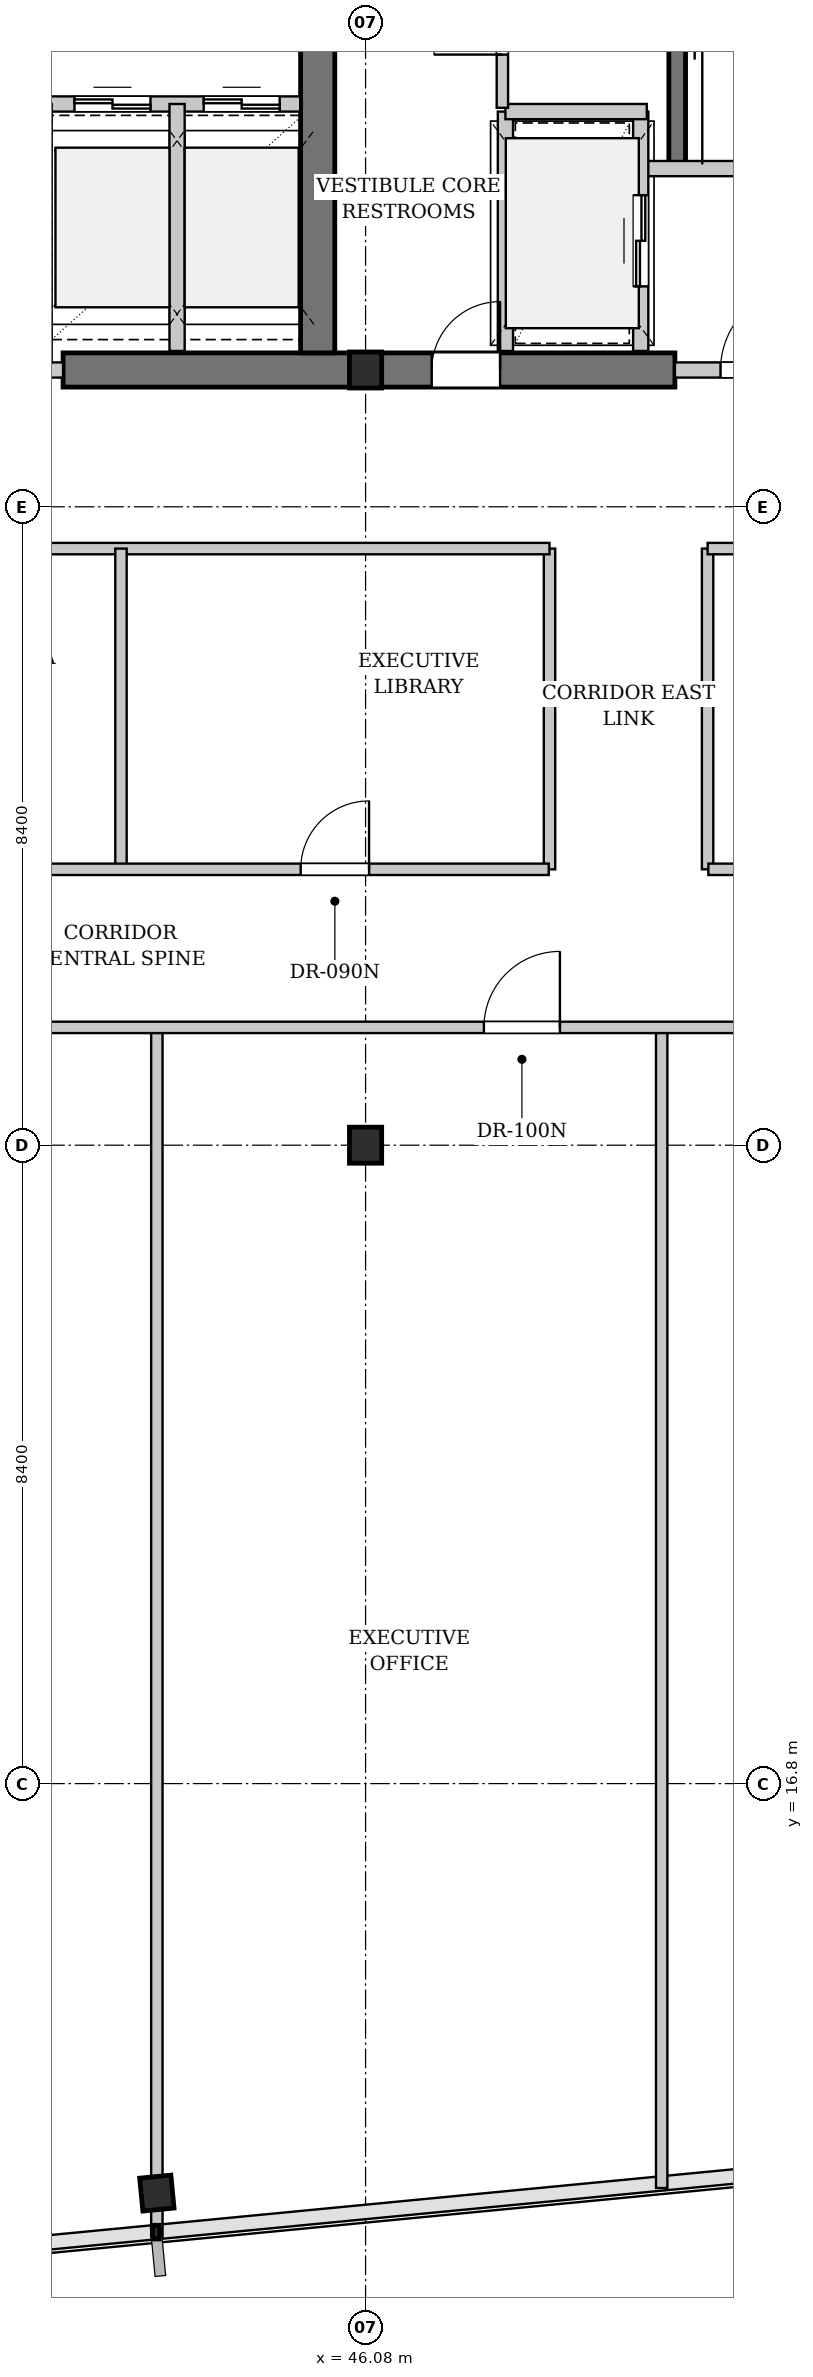
"""IFC4 building model, lengths in metres.
Left out: names, types, materials, properties, quantities, classifications, styles, units other than length and angle.
Written with IfcOpenShell. Run it as: python <this file> out.ifc"""

import sys

from ifc_helpers import new_model, si_unit, direction, frame, frame_2d, origin, origin_2d, place, context, subcontext, project, spatial, rectangle, i_section, extrude, element, fill, save


model = new_model("IFC4")
c1 = context("Model", 3, precision=1e-05, world=origin(), true_north=direction((0.0, 1.0)))
c2 = subcontext(c1, "Body", "Model", "MODEL_VIEW")
j1 = project(units=[si_unit("LENGTHUNIT", "METRE"), si_unit("PLANEANGLEUNIT", "RADIAN")], contexts=[c1])
p1 = place(None, origin())
s1 = spatial("IfcSite", under=j1, at=p1, CompositionType="ELEMENT")
p2 = place(p1, origin())
s2 = spatial("IfcBuilding", under=s1, at=p2, CompositionType="ELEMENT")
p3 = place(p2, frame((0.0, 0.0, 106.7)))
s3 = spatial("IfcBuildingStorey", under=s2, at=p3, CompositionType="ELEMENT", Elevation=106.7)
p4 = place(p3, frame((42.1, 35.4, 0.0), z_axis=(0.0, 0.0, 1.0), x_axis=(1.0, 0.0, 0.0)))
e1 = element("IfcWall", 1, at=p4, inside=s3, PredefinedType="SHEAR", context=c2, shape_type="SweptSolid", body=[
    extrude(rectangle(XDim=8.05, YDim=0.45, at=frame_2d((4.025, 0.0))), origin(), (0.0, 0.0, 1.0), 3.18),
])
p5 = place(p4, frame((4.85, 0.0, 0.0)))
e2 = element("IfcOpeningElement", 2, at=p5, cuts=e1, PredefinedType="OPENING", context=c2, shape_type="SweptSolid", body=[
    extrude(rectangle(XDim=0.9, YDim=2.15, at=frame_2d((0.45, 1.075))), frame((0.0, 0.235, 0.0), z_axis=(0.0, -1.0, 0.0), x_axis=(1.0, 0.0, 0.0)), (0.0, 0.0, 1.0), 0.47),
])
p6 = place(p3, frame((45.45, 35.625, 0.0), z_axis=(0.0, 0.0, 1.0), x_axis=(0.0, 1.0, 0.0)))
e3 = element("IfcWall", 3, at=p6, inside=s3, PredefinedType="SHEAR", context=c2, shape_type="SweptSolid", body=[
    extrude(rectangle(XDim=10.35, YDim=0.45, at=frame_2d((5.175, 0.0))), origin(), (0.0, 0.0, 1.0), 3.18),
])
p7 = place(p3, frame((50.18, 38.05, 0.0), z_axis=(0.0, 0.0, 1.0), x_axis=(0.0, 1.0, 0.0)))
e4 = element("IfcWall", 4, at=p7, inside=s3, PredefinedType="SHEAR", context=c2, shape_type="SweptSolid", body=[
    extrude(rectangle(XDim=7.925, YDim=0.22, at=frame_2d((3.962, 0.0))), origin(), (0.0, 0.0, 1.0), 3.18),
])
for number, where, z_axis, x_axis in (
    (5, (46.08, 35.4, 0.0), (0.0, 0.0, 1.0), (1.0, 0.0, 0.0)),
    (6, (46.08, 25.2, 0.0), (0.0, 0.0, 1.0), (1.0, 0.0, 0.0)),
):
    element("IfcColumn", number, at=place(p3, frame(where, z_axis=z_axis, x_axis=x_axis)), inside=s3, PredefinedType="COLUMN", context=c2, shape_type="SweptSolid", body=[
        extrude(i_section(OverallWidth=0.424, OverallDepth=0.474, WebThickness=0.047, FlangeThickness=0.077, FilletRadius=0.015, at=origin_2d()), origin(), (0.0, 0.0, 1.0), 3.4),
    ])
p8 = place(p3, frame((43.334, 11.412, 0.0), z_axis=(0.0, 0.0, 1.0), x_axis=(0.995396198367, 0.09584575252, 0.0)))
e7 = element("IfcColumn", 7, at=p8, inside=s3, PredefinedType="COLUMN", context=c2, shape_type="SweptSolid", body=[
    extrude(i_section(OverallWidth=0.412, OverallDepth=0.435, WebThickness=0.036, FlangeThickness=0.058, FilletRadius=0.015, at=origin_2d()), origin(), (0.0, 0.0, 1.0), 3.4),
])
p9 = place(p3, frame((35.6, 35.4, 0.0), z_axis=(0.0, 0.0, 1.0), x_axis=(1.0, 0.0, 0.0)))
e8 = element("IfcWall", 8, at=p9, inside=s3, PredefinedType="PARTITIONING", context=c2, shape_type="SweptSolid", body=[
    extrude(rectangle(XDim=6.5, YDim=0.2, at=frame_2d((3.25, 0.0))), origin(), (0.0, 0.0, 1.0), 2.525),
])
p10 = place(p9, frame((3.8, 0.0, 0.0)))
e9 = element("IfcOpeningElement", 9, at=p10, cuts=e8, PredefinedType="OPENING", context=c2, shape_type="SweptSolid", body=[
    extrude(rectangle(XDim=1.8, YDim=2.3, at=frame_2d((0.9, 1.15))), frame((0.0, 0.11, 0.0), z_axis=(0.0, -1.0, 0.0), x_axis=(1.0, 0.0, 0.0)), (0.0, 0.0, 1.0), 0.22),
])
p11 = place(p3, frame((41.85, 38.9, 0.0), z_axis=(0.0, 0.0, 1.0), x_axis=(1.0, 0.0, 0.0)))
e10 = element("IfcWall", 10, at=p11, inside=s3, PredefinedType="PARTITIONING", context=c2, shape_type="SweptSolid", body=[
    extrude(rectangle(XDim=3.37, YDim=0.2, at=frame_2d((1.685, 0.0))), origin(), (0.0, 0.0, 1.0), 3.18),
])
p12 = place(p11, frame((0.4, 0.0, 0.0)))
e11 = element("IfcOpeningElement", 11, at=p12, cuts=e10, PredefinedType="OPENING", context=c2, shape_type="SweptSolid", body=[
    extrude(rectangle(XDim=1.0, YDim=2.2, at=frame_2d((0.5, 1.1))), frame((0.0, 0.11, 0.0), z_axis=(0.0, -1.0, 0.0), x_axis=(1.0, 0.0, 0.0)), (0.0, 0.0, 1.0), 0.22),
])
p13 = place(p11, frame((2.1, 0.0, 0.0)))
e12 = element("IfcOpeningElement", 12, at=p13, cuts=e10, PredefinedType="OPENING", context=c2, shape_type="SweptSolid", body=[
    extrude(rectangle(XDim=1.0, YDim=2.2, at=frame_2d((0.5, 1.1))), frame((0.0, 0.11, 0.0), z_axis=(0.0, -1.0, 0.0), x_axis=(1.0, 0.0, 0.0)), (0.0, 0.0, 1.0), 0.22),
])
p14 = place(p3, frame((43.6, 35.65, 0.0), z_axis=(0.0, 0.0, 1.0), x_axis=(0.0, 1.0, 0.0)))
e13 = element("IfcWall", 13, at=p14, inside=s3, PredefinedType="PARTITIONING", context=c2, shape_type="SweptSolid", body=[
    extrude(rectangle(XDim=3.25, YDim=0.2, at=frame_2d((1.625, 0.0))), origin(), (0.0, 0.0, 1.0), 3.18),
])
p15 = place(p3, frame((49.78, 38.05, 0.0), z_axis=(0.0, 0.0, 1.0), x_axis=(1.0, 0.0, 0.0)))
e14 = element("IfcWall", 14, at=p15, inside=s3, PredefinedType="PARTITIONING", context=c2, shape_type="SweptSolid", body=[
    extrude(rectangle(XDim=3.72, YDim=0.2, at=frame_2d((1.86, 0.0))), origin(), (0.0, 0.0, 1.0), 3.18),
])
p16 = place(p15, frame((1.436, 0.0, 0.0)))
e15 = element("IfcOpeningElement", 15, at=p16, cuts=e14, PredefinedType="OPENING", context=c2, shape_type="SweptSolid", body=[
    extrude(rectangle(XDim=1.1, YDim=2.15, at=frame_2d((0.55, 1.075))), frame((0.0, 0.11, 0.0), z_axis=(0.0, -1.0, 0.0), x_axis=(1.0, 0.0, 0.0)), (0.0, 0.0, 1.0), 0.22),
])
p17 = place(p3, frame((50.15, 35.4, 0.0), z_axis=(0.0, 0.0, 1.0), x_axis=(1.0, 0.0, 0.0)))
e16 = element("IfcWall", 16, at=p17, inside=s3, PredefinedType="PARTITIONING", context=c2, shape_type="SweptSolid", body=[
    extrude(rectangle(XDim=2.3, YDim=0.2, at=frame_2d((1.15, 0.0))), origin(), (0.0, 0.0, 1.0), 2.525),
])
p18 = place(p17, frame((0.6, 0.0, 0.0)))
e17 = element("IfcOpeningElement", 17, at=p18, cuts=e16, PredefinedType="OPENING", context=c2, shape_type="SweptSolid", body=[
    extrude(rectangle(XDim=1.1, YDim=2.15, at=frame_2d((0.55, 1.075))), frame((0.0, 0.11, 0.0), z_axis=(0.0, -1.0, 0.0), x_axis=(1.0, 0.0, 0.0)), (0.0, 0.0, 1.0), 0.22),
])
p19 = place(p3, frame((49.7, 35.65, 0.0), z_axis=(0.0, 0.0, 1.0), x_axis=(0.0, 1.0, 0.0)))
e18 = element("IfcWall", 18, at=p19, inside=s3, PredefinedType="PARTITIONING", context=c2, shape_type="SweptSolid", body=[
    extrude(rectangle(XDim=3.15, YDim=0.2, at=frame_2d((1.575, 0.0))), origin(), (0.0, 0.0, 1.0), 3.18),
])
p20 = place(p19, frame((0.85, 0.0, 0.0)))
e19 = element("IfcOpeningElement", 19, at=p20, cuts=e18, PredefinedType="OPENING", context=c2, shape_type="SweptSolid", body=[
    extrude(rectangle(XDim=1.2, YDim=2.2, at=frame_2d((0.6, 1.1))), frame((0.0, 0.11, 0.0), z_axis=(0.0, -1.0, 0.0), x_axis=(1.0, 0.0, 0.0)), (0.0, 0.0, 1.0), 0.22),
])
p21 = place(p3, frame((47.92, 35.65, 0.0), z_axis=(0.0, 0.0, 1.0), x_axis=(0.0, 1.0, 0.0)))
e20 = element("IfcWall", 20, at=p21, inside=s3, PredefinedType="PARTITIONING", context=c2, shape_type="SweptSolid", body=[
    extrude(rectangle(XDim=3.15, YDim=0.2, at=frame_2d((1.575, 0.0))), origin(), (0.0, 0.0, 1.0), 3.18),
])
p22 = place(p3, frame((47.92, 38.8, 0.0), z_axis=(0.0, 0.0, 1.0), x_axis=(1.0, 0.0, 0.0)))
e21 = element("IfcWall", 21, at=p22, inside=s3, PredefinedType="PARTITIONING", context=c2, shape_type="SweptSolid", body=[
    extrude(rectangle(XDim=1.86, YDim=0.2, at=frame_2d((0.93, 0.0))), origin(), (0.0, 0.0, 1.0), 3.18),
])
p23 = place(p3, frame((47.88, 38.85, 0.0), z_axis=(0.0, 0.0, 1.0), x_axis=(0.0, 1.0, 0.0)))
e22 = element("IfcWall", 22, at=p23, inside=s3, PredefinedType="PARTITIONING", context=c2, shape_type="SweptSolid", body=[
    extrude(rectangle(XDim=4.87, YDim=0.15, at=frame_2d((2.435, 0.0))), origin(), (0.0, 0.0, 1.0), 3.18),
])
p24 = place(p23, frame((0.7, 0.0, 0.0)))
e23 = element("IfcOpeningElement", 23, at=p24, cuts=e22, PredefinedType="OPENING", context=c2, shape_type="SweptSolid", body=[
    extrude(rectangle(XDim=0.9, YDim=2.15, at=frame_2d((0.45, 1.075))), frame((0.0, 0.085, 0.0), z_axis=(0.0, -1.0, 0.0), x_axis=(1.0, 0.0, 0.0)), (0.0, 0.0, 1.0), 0.17),
])
p25 = place(p23, frame((3.15, 0.0, 0.0)))
e24 = element("IfcOpeningElement", 24, at=p25, cuts=e22, PredefinedType="OPENING", context=c2, shape_type="SweptSolid", body=[
    extrude(rectangle(XDim=0.9, YDim=2.15, at=frame_2d((0.45, 1.075))), frame((0.0, 0.085, 0.0), z_axis=(0.0, -1.0, 0.0), x_axis=(1.0, 0.0, 0.0)), (0.0, 0.0, 1.0), 0.17),
])
p26 = place(p3, frame((43.334, 10.839, 0.0), z_axis=(0.0, 0.0, 1.0), x_axis=(0.0, 1.0, 0.0)))
e25 = element("IfcWall", 25, at=p26, inside=s3, PredefinedType="PARTITIONING", context=c2, shape_type="SweptSolid", body=[
    extrude(rectangle(XDim=15.931, YDim=0.15, at=frame_2d((7.965, 0.0))), origin(), (0.0, 0.0, 1.0), 2.525),
])
p27 = place(p3, frame((49.976, 11.479, 0.0), z_axis=(0.0, 0.0, 1.0), x_axis=(0.0, 1.0, 0.0)))
e26 = element("IfcWall", 26, at=p27, inside=s3, PredefinedType="PARTITIONING", context=c2, shape_type="SweptSolid", body=[
    extrude(rectangle(XDim=15.291, YDim=0.15, at=frame_2d((7.646, 0.0))), origin(), (0.0, 0.0, 1.0), 3.18),
])
p28 = place(p3, frame((15.208, 26.75, 0.0), z_axis=(0.0, 0.0, 1.0), x_axis=(1.0, 0.0, 0.0)))
e27 = element("IfcWall", 27, at=p28, inside=s3, PredefinedType="PARTITIONING", context=c2, shape_type="SweptSolid", body=[
    extrude(rectangle(XDim=61.222, YDim=0.15, at=frame_2d((30.611, 0.0))), origin(), (0.0, 0.0, 1.0), 2.525),
])
p29 = place(p28, frame((9.474, 0.0, 0.0)))
e28 = element("IfcOpeningElement", 28, at=p29, cuts=e27, PredefinedType="OPENING", context=c2, shape_type="SweptSolid", body=[
    extrude(rectangle(XDim=1.0, YDim=2.15, at=frame_2d((0.5, 1.075))), frame((0.0, 0.085, 0.0), z_axis=(0.0, -1.0, 0.0), x_axis=(1.0, 0.0, 0.0)), (0.0, 0.0, 1.0), 0.17),
])
p30 = place(p28, frame((17.351, 0.0, 0.0)))
e29 = element("IfcOpeningElement", 29, at=p30, cuts=e27, PredefinedType="OPENING", context=c2, shape_type="SweptSolid", body=[
    extrude(rectangle(XDim=1.0, YDim=2.15, at=frame_2d((0.5, 1.075))), frame((0.0, 0.085, 0.0), z_axis=(0.0, -1.0, 0.0), x_axis=(1.0, 0.0, 0.0)), (0.0, 0.0, 1.0), 0.17),
])
p31 = place(p28, frame((24.736, 0.0, 0.0)))
e30 = element("IfcOpeningElement", 30, at=p31, cuts=e27, PredefinedType="OPENING", context=c2, shape_type="SweptSolid", body=[
    extrude(rectangle(XDim=1.0, YDim=2.15, at=frame_2d((0.5, 1.075))), frame((0.0, 0.085, 0.0), z_axis=(0.0, -1.0, 0.0), x_axis=(1.0, 0.0, 0.0)), (0.0, 0.0, 1.0), 0.17),
])
p32 = place(p28, frame((32.429, 0.0, 0.0)))
e31 = element("IfcOpeningElement", 31, at=p32, cuts=e27, PredefinedType="OPENING", context=c2, shape_type="SweptSolid", body=[
    extrude(rectangle(XDim=1.0, YDim=2.15, at=frame_2d((0.5, 1.075))), frame((0.0, 0.085, 0.0), z_axis=(0.0, -1.0, 0.0), x_axis=(1.0, 0.0, 0.0)), (0.0, 0.0, 1.0), 0.17),
])
p33 = place(p28, frame((35.993, 0.0, 0.0)))
e32 = element("IfcOpeningElement", 32, at=p33, cuts=e27, PredefinedType="OPENING", context=c2, shape_type="SweptSolid", body=[
    extrude(rectangle(XDim=1.0, YDim=2.15, at=frame_2d((0.5, 1.075))), frame((0.0, 0.085, 0.0), z_axis=(0.0, -1.0, 0.0), x_axis=(1.0, 0.0, 0.0)), (0.0, 0.0, 1.0), 0.17),
])
p34 = place(p28, frame((43.982, 0.0, 0.0)))
e33 = element("IfcOpeningElement", 33, at=p34, cuts=e27, PredefinedType="OPENING", context=c2, shape_type="SweptSolid", body=[
    extrude(rectangle(XDim=1.0, YDim=2.15, at=frame_2d((0.5, 1.075))), frame((0.0, 0.085, 0.0), z_axis=(0.0, -1.0, 0.0), x_axis=(1.0, 0.0, 0.0)), (0.0, 0.0, 1.0), 0.17),
])
p35 = place(p28, frame((50.267, 0.0, 0.0)))
e34 = element("IfcOpeningElement", 34, at=p35, cuts=e27, PredefinedType="OPENING", context=c2, shape_type="SweptSolid", body=[
    extrude(rectangle(XDim=1.0, YDim=2.15, at=frame_2d((0.5, 1.075))), frame((0.0, 0.085, 0.0), z_axis=(0.0, -1.0, 0.0), x_axis=(1.0, 0.0, 0.0)), (0.0, 0.0, 1.0), 0.17),
])
for number, where, z_axis, x_axis in (
    (35, (48.5, 28.83, 0.0), (0.0, 0.0, 1.0), (0.0, 1.0, 0.0)),
    (36, (50.58, 28.83, 0.0), (0.0, 0.0, 1.0), (0.0, 1.0, 0.0)),
):
    element("IfcWall", number, at=place(p3, frame(where, z_axis=z_axis, x_axis=x_axis)), inside=s3, PredefinedType="PARTITIONING", context=c2, shape_type="SweptSolid", body=[
        extrude(rectangle(XDim=4.22, YDim=0.15, at=frame_2d((2.11, 0.0))), origin(), (0.0, 0.0, 1.0), 3.18),
    ])
p36 = place(p3, frame((28.38, 33.05, 0.0), z_axis=(0.0, 0.0, 1.0), x_axis=(1.0, 0.0, 0.0)))
e37 = element("IfcWall", 37, at=p36, inside=s3, PredefinedType="PARTITIONING", context=c2, shape_type="SweptSolid", body=[
    extrude(rectangle(XDim=20.12, YDim=0.15, at=frame_2d((10.06, 0.0))), origin(), (0.0, 0.0, 1.0), 3.18),
])
p37 = place(p3, frame((50.58, 33.05, 0.0), z_axis=(0.0, 0.0, 1.0), x_axis=(1.0, 0.0, 0.0)))
e38 = element("IfcWall", 38, at=p37, inside=s3, PredefinedType="PARTITIONING", context=c2, shape_type="SweptSolid", body=[
    extrude(rectangle(XDim=19.049, YDim=0.15, at=frame_2d((9.524, 0.0))), origin(), (0.0, 0.0, 1.0), 2.525),
])
p38 = place(p3, frame((42.862, 28.83, 0.0), z_axis=(0.0, 0.0, 1.0), x_axis=(0.0, 1.0, 0.0)))
e39 = element("IfcWall", 39, at=p38, inside=s3, PredefinedType="PARTITIONING", context=c2, shape_type="SweptSolid", body=[
    extrude(rectangle(XDim=4.22, YDim=0.15, at=frame_2d((2.11, 0.0))), origin(), (0.0, 0.0, 1.0), 3.18),
])
p39 = place(p3, frame((28.39, 28.83, 0.0), z_axis=(0.0, 0.0, 1.0), x_axis=(1.0, 0.0, 0.0)))
e40 = element("IfcWall", 40, at=p39, inside=s3, PredefinedType="PARTITIONING", context=c2, shape_type="SweptSolid", body=[
    extrude(rectangle(XDim=20.1, YDim=0.15, at=frame_2d((10.05, 0.0))), origin(), (0.0, 0.0, 1.0), 3.18),
])
p40 = place(p39, frame((1.259, 0.0, 0.0)))
e41 = element("IfcOpeningElement", 41, at=p40, cuts=e40, PredefinedType="OPENING", context=c2, shape_type="SweptSolid", body=[
    extrude(rectangle(XDim=0.9, YDim=2.15, at=frame_2d((0.45, 1.075))), frame((0.0, 0.085, 0.0), z_axis=(0.0, -1.0, 0.0), x_axis=(1.0, 0.0, 0.0)), (0.0, 0.0, 1.0), 0.17),
])
p41 = place(p39, frame((5.379, 0.0, 0.0)))
e42 = element("IfcOpeningElement", 42, at=p41, cuts=e40, PredefinedType="OPENING", context=c2, shape_type="SweptSolid", body=[
    extrude(rectangle(XDim=0.9, YDim=2.15, at=frame_2d((0.45, 1.075))), frame((0.0, 0.085, 0.0), z_axis=(0.0, -1.0, 0.0), x_axis=(1.0, 0.0, 0.0)), (0.0, 0.0, 1.0), 0.17),
])
p42 = place(p39, frame((10.906, 0.0, 0.0)))
e43 = element("IfcOpeningElement", 43, at=p42, cuts=e40, PredefinedType="OPENING", context=c2, shape_type="SweptSolid", body=[
    extrude(rectangle(XDim=0.9, YDim=2.15, at=frame_2d((0.45, 1.075))), frame((0.0, 0.085, 0.0), z_axis=(0.0, -1.0, 0.0), x_axis=(1.0, 0.0, 0.0)), (0.0, 0.0, 1.0), 0.17),
])
p43 = place(p39, frame((16.836, 0.0, 0.0)))
e44 = element("IfcOpeningElement", 44, at=p43, cuts=e40, PredefinedType="OPENING", context=c2, shape_type="SweptSolid", body=[
    extrude(rectangle(XDim=0.9, YDim=2.15, at=frame_2d((0.45, 1.075))), frame((0.0, 0.085, 0.0), z_axis=(0.0, -1.0, 0.0), x_axis=(1.0, 0.0, 0.0)), (0.0, 0.0, 1.0), 0.17),
])
p44 = place(p3, frame((50.59, 28.83, 0.0), z_axis=(0.0, 0.0, 1.0), x_axis=(1.0, 0.0, 0.0)))
e45 = element("IfcWall", 45, at=p44, inside=s3, PredefinedType="PARTITIONING", context=c2, shape_type="SweptSolid", body=[
    extrude(rectangle(XDim=19.019, YDim=0.15, at=frame_2d((9.509, 0.0))), origin(), (0.0, 0.0, 1.0), 2.525),
])
p45 = place(p44, frame((1.167, 0.0, 0.0)))
e46 = element("IfcOpeningElement", 46, at=p45, cuts=e45, PredefinedType="OPENING", context=c2, shape_type="SweptSolid", body=[
    extrude(rectangle(XDim=0.9, YDim=2.15, at=frame_2d((0.45, 1.075))), frame((0.0, 0.085, 0.0), z_axis=(0.0, -1.0, 0.0), x_axis=(1.0, 0.0, 0.0)), (0.0, 0.0, 1.0), 0.17),
])
p46 = place(p44, frame((5.065, 0.0, 0.0)))
e47 = element("IfcOpeningElement", 47, at=p46, cuts=e45, PredefinedType="OPENING", context=c2, shape_type="SweptSolid", body=[
    extrude(rectangle(XDim=0.9, YDim=2.15, at=frame_2d((0.45, 1.075))), frame((0.0, 0.085, 0.0), z_axis=(0.0, -1.0, 0.0), x_axis=(1.0, 0.0, 0.0)), (0.0, 0.0, 1.0), 0.17),
])
p47 = place(p44, frame((10.296, 0.0, 0.0)))
e48 = element("IfcOpeningElement", 48, at=p47, cuts=e45, PredefinedType="OPENING", context=c2, shape_type="SweptSolid", body=[
    extrude(rectangle(XDim=0.9, YDim=2.15, at=frame_2d((0.45, 1.075))), frame((0.0, 0.085, 0.0), z_axis=(0.0, -1.0, 0.0), x_axis=(1.0, 0.0, 0.0)), (0.0, 0.0, 1.0), 0.17),
])
p48 = place(p44, frame((15.906, 0.0, 0.0)))
e49 = element("IfcOpeningElement", 49, at=p48, cuts=e45, PredefinedType="OPENING", context=c2, shape_type="SweptSolid", body=[
    extrude(rectangle(XDim=0.9, YDim=2.15, at=frame_2d((0.45, 1.075))), frame((0.0, 0.085, 0.0), z_axis=(0.0, -1.0, 0.0), x_axis=(1.0, 0.0, 0.0)), (0.0, 0.0, 1.0), 0.17),
])
p49 = place(p12, origin())
e50 = element("IfcDoor", 50, at=p49, inside=s3, OperationType="DOUBLE_DOOR_SLIDING", PredefinedType="DOOR", context=c2, shape_type="SweptSolid", body=[
    extrude(rectangle(XDim=1.0, YDim=2.2, at=frame_2d((0.5, 1.1))), frame((0.0, 0.025, 0.0), z_axis=(0.0, -1.0, 0.0), x_axis=(1.0, 0.0, 0.0)), (0.0, 0.0, 1.0), 0.05),
])
fill(e11, e50)
p50 = place(p13, origin())
e51 = element("IfcDoor", 51, at=p50, inside=s3, OperationType="DOUBLE_DOOR_SLIDING", PredefinedType="DOOR", context=c2, shape_type="SweptSolid", body=[
    extrude(rectangle(XDim=1.0, YDim=2.2, at=frame_2d((0.5, 1.1))), frame((0.0, 0.025, 0.0), z_axis=(0.0, -1.0, 0.0), x_axis=(1.0, 0.0, 0.0)), (0.0, 0.0, 1.0), 0.05),
])
fill(e12, e51)
p51 = place(p18, origin())
e52 = element("IfcDoor", 52, at=p51, inside=s3, OperationType="SINGLE_SWING_RIGHT", PredefinedType="DOOR", context=c2, shape_type="SweptSolid", body=[
    extrude(rectangle(XDim=1.1, YDim=2.15, at=frame_2d((0.55, 1.075))), frame((0.0, 0.025, 0.0), z_axis=(0.0, -1.0, 0.0), x_axis=(1.0, 0.0, 0.0)), (0.0, 0.0, 1.0), 0.05),
])
fill(e17, e52)
p52 = place(p20, origin())
e53 = element("IfcDoor", 53, at=p52, inside=s3, OperationType="DOUBLE_DOOR_SLIDING", PredefinedType="DOOR", context=c2, shape_type="SweptSolid", body=[
    extrude(rectangle(XDim=1.2, YDim=2.2, at=frame_2d((0.6, 1.1))), frame((0.0, 0.025, 0.0), z_axis=(0.0, -1.0, 0.0), x_axis=(1.0, 0.0, 0.0)), (0.0, 0.0, 1.0), 0.05),
])
fill(e19, e53)
p53 = place(p24, origin())
e54 = element("IfcDoor", 54, at=p53, inside=s3, OperationType="SINGLE_SWING_LEFT", PredefinedType="DOOR", context=c2, shape_type="SweptSolid", body=[
    extrude(rectangle(XDim=0.9, YDim=2.15, at=frame_2d((0.45, 1.075))), frame((0.0, 0.025, 0.0), z_axis=(0.0, -1.0, 0.0), x_axis=(1.0, 0.0, 0.0)), (0.0, 0.0, 1.0), 0.05),
])
fill(e23, e54)
p54 = place(p32, origin())
e55 = element("IfcDoor", 55, at=p54, inside=s3, OperationType="SINGLE_SWING_RIGHT", PredefinedType="DOOR", context=c2, shape_type="SweptSolid", body=[
    extrude(rectangle(XDim=1.0, YDim=2.15, at=frame_2d((0.5, 1.075))), frame((0.0, 0.025, 0.0), z_axis=(0.0, -1.0, 0.0), x_axis=(1.0, 0.0, 0.0)), (0.0, 0.0, 1.0), 0.05),
])
fill(e31, e55)
p55 = place(p43, origin())
e56 = element("IfcDoor", 56, at=p55, inside=s3, OperationType="SINGLE_SWING_RIGHT", PredefinedType="DOOR", context=c2, shape_type="SweptSolid", body=[
    extrude(rectangle(XDim=0.9, YDim=2.15, at=frame_2d((0.45, 1.075))), frame((0.0, 0.025, 0.0), z_axis=(0.0, -1.0, 0.0), x_axis=(1.0, 0.0, 0.0)), (0.0, 0.0, 1.0), 0.05),
])
fill(e44, e56)
p56 = place(p5, origin())
e57 = element("IfcDoor", 57, at=p56, inside=s3, OperationType="SINGLE_SWING_RIGHT", PredefinedType="DOOR", context=c2, shape_type="SweptSolid", body=[
    extrude(rectangle(XDim=0.9, YDim=2.15, at=frame_2d((0.45, 1.075))), frame((0.0, 0.025, 0.0), z_axis=(0.0, -1.0, 0.0), x_axis=(1.0, 0.0, 0.0)), (0.0, 0.0, 1.0), 0.05),
])
fill(e2, e57)
save(model, sys.argv[1])
